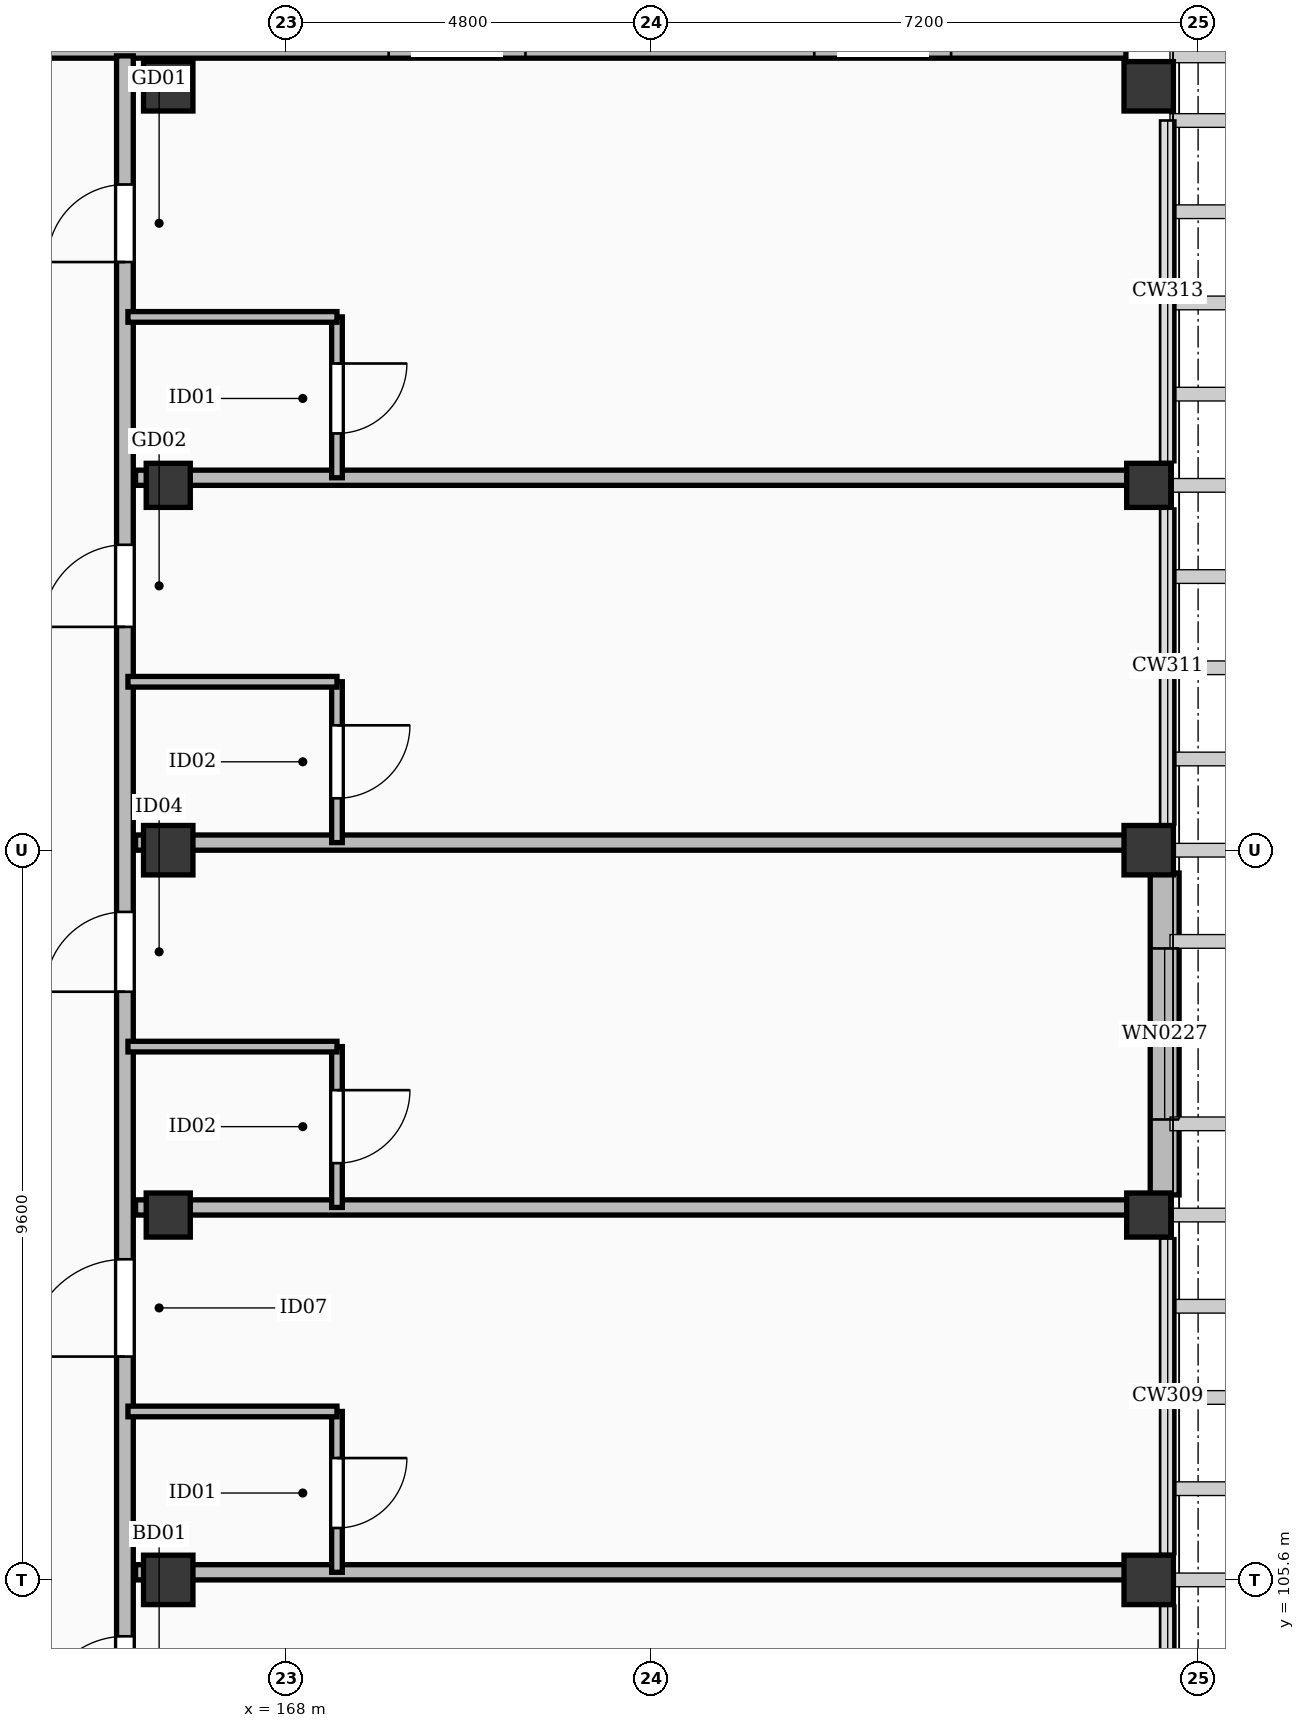
"""IFC4 building model, lengths in metres.
Left out: names, types, materials, properties, quantities, classifications, styles, units other than length and angle.
Written with IfcOpenShell. Run it as: python <this file> out.ifc"""

import sys

from ifc_helpers import new_model, si_unit, direction, frame, frame_2d, origin, origin_2d, place, context, subcontext, project, spatial, rectangle, extrude, element, fill, save


model = new_model("IFC4")
c1 = context("Model", 3, precision=1e-05, world=origin(), true_north=direction((0.0, 1.0)))
c2 = subcontext(c1, "Body", "Model", "MODEL_VIEW")
j1 = project(units=[si_unit("LENGTHUNIT", "METRE"), si_unit("PLANEANGLEUNIT", "RADIAN")], contexts=[c1])
p1 = place(None, origin())
s1 = spatial("IfcSite", under=j1, at=p1, CompositionType="ELEMENT")
p2 = place(p1, origin())
s2 = spatial("IfcBuilding", under=s1, at=p2, CompositionType="ELEMENT")
p3 = place(p2, frame((0.0, 0.0, 39.0)))
s3 = spatial("IfcBuildingStorey", under=s2, at=p3, CompositionType="ELEMENT", Elevation=39.0)
for number, where, z_axis, x_axis in (
    (1, (166.45, 105.6, 0.0), (0.0, 0.0, 1.0), (1.0, 0.0, 0.0)),
    (2, (166.45, 115.2, 0.0), (0.0, 0.0, 1.0), (1.0, 0.0, 0.0)),
    (3, (166.45, 125.25, 0.0), (0.0, 0.0, 1.0), (1.0, 0.0, 0.0)),
    (4, (179.35, 105.6, 0.0), (0.0, 0.0, 1.0), (1.0, 0.0, 0.0)),
    (5, (179.35, 115.2, 0.0), (0.0, 0.0, 1.0), (1.0, 0.0, 0.0)),
    (6, (179.35, 125.25, 0.0), (0.0, 0.0, 1.0), (1.0, 0.0, 0.0)),
):
    element("IfcColumn", number, at=place(p3, frame(where, z_axis=z_axis, x_axis=x_axis)), inside=s3, PredefinedType="COLUMN", context=c2, shape_type="SweptSolid", body=[
        extrude(rectangle(XDim=0.65, YDim=0.65, at=origin_2d()), origin(), (0.0, 0.0, 1.0), 3.6),
    ])
for number, where, z_axis, x_axis in (
    (7, (166.45, 110.4, 0.0), (0.0, 0.0, 1.0), (1.0, 0.0, 0.0)),
    (8, (166.45, 120.0, 0.0), (0.0, 0.0, 1.0), (1.0, 0.0, 0.0)),
    (9, (179.35, 110.4, 0.0), (0.0, 0.0, 1.0), (1.0, 0.0, 0.0)),
    (10, (179.35, 120.0, 0.0), (0.0, 0.0, 1.0), (1.0, 0.0, 0.0)),
):
    element("IfcColumn", number, at=place(p3, frame(where, z_axis=z_axis, x_axis=x_axis)), inside=s3, PredefinedType="COLUMN", context=c2, shape_type="SweptSolid", body=[
        extrude(rectangle(XDim=0.58, YDim=0.58, at=origin_2d()), origin(), (0.0, 0.0, 1.0), 3.6),
    ])
p4 = place(p3, frame((149.75, 125.81, 0.0), z_axis=(0.0, 0.0, 1.0), x_axis=(1.0, 0.0, 0.0)))
e11 = element("IfcWall", 11, at=p4, inside=s3, PredefinedType="SOLIDWALL", context=c2, shape_type="SweptSolid", body=[
    extrude(rectangle(XDim=29.3, YDim=0.38, at=frame_2d((14.65, 0.0))), origin(), (0.0, 0.0, 1.0), 3.36),
])
p5 = place(p4, frame((3.6, 0.0, 0.55)))
e12 = element("IfcOpeningElement", 12, at=p5, cuts=e11, PredefinedType="OPENING", context=c2, shape_type="SweptSolid", body=[
    extrude(rectangle(XDim=1.8, YDim=1.76, at=frame_2d((0.9, 0.88))), frame((0.0, 0.202, 0.0), z_axis=(0.0, -1.0, 0.0), x_axis=(1.0, 0.0, 0.0)), (0.0, 0.0, 1.0), 0.404),
])
p6 = place(p4, frame((9.2, 0.0, 0.55)))
e13 = element("IfcOpeningElement", 13, at=p6, cuts=e11, PredefinedType="OPENING", context=c2, shape_type="SweptSolid", body=[
    extrude(rectangle(XDim=1.8, YDim=1.76, at=frame_2d((0.9, 0.88))), frame((0.0, 0.202, 0.0), z_axis=(0.0, -1.0, 0.0), x_axis=(1.0, 0.0, 0.0)), (0.0, 0.0, 1.0), 0.404),
])
p7 = place(p4, frame((19.6, 0.0, 0.55)))
e14 = element("IfcOpeningElement", 14, at=p7, cuts=e11, PredefinedType="OPENING", context=c2, shape_type="SweptSolid", body=[
    extrude(rectangle(XDim=1.8, YDim=1.76, at=frame_2d((0.9, 0.88))), frame((0.0, 0.202, 0.0), z_axis=(0.0, -1.0, 0.0), x_axis=(1.0, 0.0, 0.0)), (0.0, 0.0, 1.0), 0.404),
])
p8 = place(p4, frame((25.2, 0.0, 0.55)))
e15 = element("IfcOpeningElement", 15, at=p8, cuts=e11, PredefinedType="OPENING", context=c2, shape_type="SweptSolid", body=[
    extrude(rectangle(XDim=1.8, YDim=1.76, at=frame_2d((0.9, 0.88))), frame((0.0, 0.202, 0.0), z_axis=(0.0, -1.0, 0.0), x_axis=(1.0, 0.0, 0.0)), (0.0, 0.0, 1.0), 0.404),
])
p9 = place(p3, frame((179.56, 114.9, 0.0), z_axis=(0.0, 0.0, 1.0), x_axis=(0.0, -1.0, 0.0)))
e16 = element("IfcWall", 16, at=p9, inside=s3, PredefinedType="SOLIDWALL", context=c2, shape_type="SweptSolid", body=[
    extrude(rectangle(XDim=4.235, YDim=0.38, at=frame_2d((2.117, 0.0))), origin(), (0.0, 0.0, 1.0), 2.602),
])
p10 = place(p9, frame((0.992, 0.0, 0.55)))
e17 = element("IfcOpeningElement", 17, at=p10, cuts=e16, PredefinedType="OPENING", context=c2, shape_type="SweptSolid", body=[
    extrude(rectangle(XDim=2.25, YDim=1.79, at=frame_2d((1.125, 0.895))), frame((0.0, 0.202, 0.0), z_axis=(0.0, -1.0, 0.0), x_axis=(1.0, 0.0, 0.0)), (0.0, 0.0, 1.0), 0.404),
])
p11 = place(p3, frame((165.88, 57.95, 0.0), z_axis=(0.0, 0.0, 1.0), x_axis=(0.0, 1.0, 0.0)))
e18 = element("IfcWall", 18, at=p11, inside=s3, PredefinedType="PARTITIONING", context=c2, shape_type="SweptSolid", body=[
    extrude(rectangle(XDim=67.7, YDim=0.22, at=frame_2d((33.85, 0.0))), origin(), (0.0, 0.0, 1.0), 2.602),
])
p12 = place(p11, frame((5.15, 0.0, 0.0)))
e19 = element("IfcOpeningElement", 19, at=p12, cuts=e18, PredefinedType="OPENING", context=c2, shape_type="SweptSolid", body=[
    extrude(rectangle(XDim=0.98, YDim=2.15, at=frame_2d((0.49, 1.075))), frame((0.0, 0.122, 0.0), z_axis=(0.0, -1.0, 0.0), x_axis=(1.0, 0.0, 0.0)), (0.0, 0.0, 1.0), 0.244),
])
p13 = place(p11, frame((11.838, 0.0, 0.0)))
e20 = element("IfcOpeningElement", 20, at=p13, cuts=e18, PredefinedType="OPENING", context=c2, shape_type="SweptSolid", body=[
    extrude(rectangle(XDim=1.5, YDim=2.3, at=frame_2d((0.75, 1.15))), frame((0.0, 0.122, 0.0), z_axis=(0.0, -1.0, 0.0), x_axis=(1.0, 0.0, 0.0)), (0.0, 0.0, 1.0), 0.244),
])
p14 = place(p11, frame((16.988, 0.0, 0.0)))
e21 = element("IfcOpeningElement", 21, at=p14, cuts=e18, PredefinedType="OPENING", context=c2, shape_type="SweptSolid", body=[
    extrude(rectangle(XDim=1.12, YDim=2.15, at=frame_2d((0.56, 1.075))), frame((0.0, 0.122, 0.0), z_axis=(0.0, -1.0, 0.0), x_axis=(1.0, 0.0, 0.0)), (0.0, 0.0, 1.0), 0.244),
])
p15 = place(p11, frame((21.788, 0.0, 0.0)))
e22 = element("IfcOpeningElement", 22, at=p15, cuts=e18, PredefinedType="OPENING", context=c2, shape_type="SweptSolid", body=[
    extrude(rectangle(XDim=1.28, YDim=2.16, at=frame_2d((0.64, 1.08))), frame((0.0, 0.122, 0.0), z_axis=(0.0, -1.0, 0.0), x_axis=(1.0, 0.0, 0.0)), (0.0, 0.0, 1.0), 0.244),
])
p16 = place(p11, frame((26.588, 0.0, 0.0)))
e23 = element("IfcOpeningElement", 23, at=p16, cuts=e18, PredefinedType="OPENING", context=c2, shape_type="SweptSolid", body=[
    extrude(rectangle(XDim=1.05, YDim=2.18, at=frame_2d((0.525, 1.09))), frame((0.0, 0.122, 0.0), z_axis=(0.0, -1.0, 0.0), x_axis=(1.0, 0.0, 0.0)), (0.0, 0.0, 1.0), 0.244),
])
p17 = place(p11, frame((31.388, 0.0, 0.0)))
e24 = element("IfcOpeningElement", 24, at=p17, cuts=e18, PredefinedType="OPENING", context=c2, shape_type="SweptSolid", body=[
    extrude(rectangle(XDim=1.08, YDim=2.25, at=frame_2d((0.54, 1.125))), frame((0.0, 0.122, 0.0), z_axis=(0.0, -1.0, 0.0), x_axis=(1.0, 0.0, 0.0)), (0.0, 0.0, 1.0), 0.244),
])
p18 = place(p11, frame((36.188, 0.0, 0.0)))
e25 = element("IfcOpeningElement", 25, at=p18, cuts=e18, PredefinedType="OPENING", context=c2, shape_type="SweptSolid", body=[
    extrude(rectangle(XDim=1.02, YDim=2.2, at=frame_2d((0.51, 1.1))), frame((0.0, 0.122, 0.0), z_axis=(0.0, -1.0, 0.0), x_axis=(1.0, 0.0, 0.0)), (0.0, 0.0, 1.0), 0.244),
])
p19 = place(p11, frame((40.638, 0.0, 0.0)))
e26 = element("IfcOpeningElement", 26, at=p19, cuts=e18, PredefinedType="OPENING", context=c2, shape_type="SweptSolid", body=[
    extrude(rectangle(XDim=1.5, YDim=2.3, at=frame_2d((0.75, 1.15))), frame((0.0, 0.122, 0.0), z_axis=(0.0, -1.0, 0.0), x_axis=(1.0, 0.0, 0.0)), (0.0, 0.0, 1.0), 0.244),
])
p20 = place(p11, frame((45.788, 0.0, 0.0)))
e27 = element("IfcOpeningElement", 27, at=p20, cuts=e18, PredefinedType="OPENING", context=c2, shape_type="SweptSolid", body=[
    extrude(rectangle(XDim=1.12, YDim=2.15, at=frame_2d((0.56, 1.075))), frame((0.0, 0.122, 0.0), z_axis=(0.0, -1.0, 0.0), x_axis=(1.0, 0.0, 0.0)), (0.0, 0.0, 1.0), 0.244),
])
p21 = place(p11, frame((50.588, 0.0, 0.0)))
e28 = element("IfcOpeningElement", 28, at=p21, cuts=e18, PredefinedType="OPENING", context=c2, shape_type="SweptSolid", body=[
    extrude(rectangle(XDim=1.28, YDim=2.16, at=frame_2d((0.64, 1.08))), frame((0.0, 0.122, 0.0), z_axis=(0.0, -1.0, 0.0), x_axis=(1.0, 0.0, 0.0)), (0.0, 0.0, 1.0), 0.244),
])
p22 = place(p11, frame((55.388, 0.0, 0.0)))
e29 = element("IfcOpeningElement", 29, at=p22, cuts=e18, PredefinedType="OPENING", context=c2, shape_type="SweptSolid", body=[
    extrude(rectangle(XDim=1.05, YDim=2.18, at=frame_2d((0.525, 1.09))), frame((0.0, 0.122, 0.0), z_axis=(0.0, -1.0, 0.0), x_axis=(1.0, 0.0, 0.0)), (0.0, 0.0, 1.0), 0.244),
])
p23 = place(p11, frame((60.188, 0.0, 0.0)))
e30 = element("IfcOpeningElement", 30, at=p23, cuts=e18, PredefinedType="OPENING", context=c2, shape_type="SweptSolid", body=[
    extrude(rectangle(XDim=1.08, YDim=2.25, at=frame_2d((0.54, 1.125))), frame((0.0, 0.122, 0.0), z_axis=(0.0, -1.0, 0.0), x_axis=(1.0, 0.0, 0.0)), (0.0, 0.0, 1.0), 0.244),
])
p24 = place(p11, frame((64.988, 0.0, 0.0)))
e31 = element("IfcOpeningElement", 31, at=p24, cuts=e18, PredefinedType="OPENING", context=c2, shape_type="SweptSolid", body=[
    extrude(rectangle(XDim=1.02, YDim=2.2, at=frame_2d((0.51, 1.1))), frame((0.0, 0.122, 0.0), z_axis=(0.0, -1.0, 0.0), x_axis=(1.0, 0.0, 0.0)), (0.0, 0.0, 1.0), 0.244),
])
p25 = place(p3, frame((166.02, 105.7, 0.0), z_axis=(0.0, 0.0, 1.0), x_axis=(1.0, 0.0, 0.0)))
e32 = element("IfcWall", 32, at=p25, inside=s3, PredefinedType="PARTITIONING", context=c2, shape_type="SweptSolid", body=[
    extrude(rectangle(XDim=13.23, YDim=0.2, at=frame_2d((6.615, 0.0))), origin(), (0.0, 0.0, 1.0), 2.602),
])
p26 = place(p3, frame((168.67, 105.7, 0.0), z_axis=(0.0, 0.0, 1.0), x_axis=(0.0, 1.0, 0.0)))
e33 = element("IfcWall", 33, at=p26, inside=s3, PredefinedType="PARTITIONING", context=c2, shape_type="SweptSolid", body=[
    extrude(rectangle(XDim=2.116, YDim=0.14, at=frame_2d((1.058, 0.0))), origin(), (0.0, 0.0, 1.0), 2.772),
])
p27 = place(p26, frame((0.583, 0.0, 0.0)))
e34 = element("IfcOpeningElement", 34, at=p27, cuts=e33, PredefinedType="OPENING", context=c2, shape_type="SweptSolid", body=[
    extrude(rectangle(XDim=0.92, YDim=2.1, at=frame_2d((0.46, 1.05))), frame((0.0, 0.082, 0.0), z_axis=(0.0, -1.0, 0.0), x_axis=(1.0, 0.0, 0.0)), (0.0, 0.0, 1.0), 0.164),
])
p28 = place(p3, frame((165.92, 107.816, 0.0), z_axis=(0.0, 0.0, 1.0), x_axis=(1.0, 0.0, 0.0)))
e35 = element("IfcWall", 35, at=p28, inside=s3, PredefinedType="PARTITIONING", context=c2, shape_type="SweptSolid", body=[
    extrude(rectangle(XDim=2.75, YDim=0.14, at=frame_2d((1.375, 0.0))), origin(), (0.0, 0.0, 1.0), 2.772),
])
p29 = place(p3, frame((166.02, 110.5, 0.0), z_axis=(0.0, 0.0, 1.0), x_axis=(1.0, 0.0, 0.0)))
e36 = element("IfcWall", 36, at=p29, inside=s3, PredefinedType="PARTITIONING", context=c2, shape_type="SweptSolid", body=[
    extrude(rectangle(XDim=13.23, YDim=0.2, at=frame_2d((6.615, 0.0))), origin(), (0.0, 0.0, 1.0), 2.602),
])
p30 = place(p3, frame((168.67, 110.5, 0.0), z_axis=(0.0, 0.0, 1.0), x_axis=(0.0, 1.0, 0.0)))
e37 = element("IfcWall", 37, at=p30, inside=s3, PredefinedType="PARTITIONING", context=c2, shape_type="SweptSolid", body=[
    extrude(rectangle(XDim=2.116, YDim=0.14, at=frame_2d((1.058, 0.0))), origin(), (0.0, 0.0, 1.0), 2.772),
])
p31 = place(p30, frame((0.583, 0.0, 0.0)))
e38 = element("IfcOpeningElement", 38, at=p31, cuts=e37, PredefinedType="OPENING", context=c2, shape_type="SweptSolid", body=[
    extrude(rectangle(XDim=0.96, YDim=2.12, at=frame_2d((0.48, 1.06))), frame((0.0, 0.082, 0.0), z_axis=(0.0, -1.0, 0.0), x_axis=(1.0, 0.0, 0.0)), (0.0, 0.0, 1.0), 0.164),
])
p32 = place(p3, frame((165.92, 112.616, 0.0), z_axis=(0.0, 0.0, 1.0), x_axis=(1.0, 0.0, 0.0)))
e39 = element("IfcWall", 39, at=p32, inside=s3, PredefinedType="PARTITIONING", context=c2, shape_type="SweptSolid", body=[
    extrude(rectangle(XDim=2.75, YDim=0.14, at=frame_2d((1.375, 0.0))), origin(), (0.0, 0.0, 1.0), 2.772),
])
p33 = place(p3, frame((166.02, 115.3, 0.0), z_axis=(0.0, 0.0, 1.0), x_axis=(1.0, 0.0, 0.0)))
e40 = element("IfcWall", 40, at=p33, inside=s3, PredefinedType="PARTITIONING", context=c2, shape_type="SweptSolid", body=[
    extrude(rectangle(XDim=13.23, YDim=0.2, at=frame_2d((6.615, 0.0))), origin(), (0.0, 0.0, 1.0), 2.602),
])
p34 = place(p3, frame((168.67, 115.3, 0.0), z_axis=(0.0, 0.0, 1.0), x_axis=(0.0, 1.0, 0.0)))
e41 = element("IfcWall", 41, at=p34, inside=s3, PredefinedType="PARTITIONING", context=c2, shape_type="SweptSolid", body=[
    extrude(rectangle(XDim=2.116, YDim=0.14, at=frame_2d((1.058, 0.0))), origin(), (0.0, 0.0, 1.0), 2.772),
])
p35 = place(p34, frame((0.583, 0.0, 0.0)))
e42 = element("IfcOpeningElement", 42, at=p35, cuts=e41, PredefinedType="OPENING", context=c2, shape_type="SweptSolid", body=[
    extrude(rectangle(XDim=0.96, YDim=2.12, at=frame_2d((0.48, 1.06))), frame((0.0, 0.082, 0.0), z_axis=(0.0, -1.0, 0.0), x_axis=(1.0, 0.0, 0.0)), (0.0, 0.0, 1.0), 0.164),
])
p36 = place(p3, frame((165.92, 117.416, 0.0), z_axis=(0.0, 0.0, 1.0), x_axis=(1.0, 0.0, 0.0)))
e43 = element("IfcWall", 43, at=p36, inside=s3, PredefinedType="PARTITIONING", context=c2, shape_type="SweptSolid", body=[
    extrude(rectangle(XDim=2.75, YDim=0.14, at=frame_2d((1.375, 0.0))), origin(), (0.0, 0.0, 1.0), 2.772),
])
p37 = place(p3, frame((166.02, 120.1, 0.0), z_axis=(0.0, 0.0, 1.0), x_axis=(1.0, 0.0, 0.0)))
e44 = element("IfcWall", 44, at=p37, inside=s3, PredefinedType="PARTITIONING", context=c2, shape_type="SweptSolid", body=[
    extrude(rectangle(XDim=13.23, YDim=0.2, at=frame_2d((6.615, 0.0))), origin(), (0.0, 0.0, 1.0), 2.602),
])
p38 = place(p3, frame((168.67, 120.1, 0.0), z_axis=(0.0, 0.0, 1.0), x_axis=(0.0, 1.0, 0.0)))
e45 = element("IfcWall", 45, at=p38, inside=s3, PredefinedType="PARTITIONING", context=c2, shape_type="SweptSolid", body=[
    extrude(rectangle(XDim=2.116, YDim=0.14, at=frame_2d((1.058, 0.0))), origin(), (0.0, 0.0, 1.0), 2.772),
])
p39 = place(p38, frame((0.583, 0.0, 0.0)))
e46 = element("IfcOpeningElement", 46, at=p39, cuts=e45, PredefinedType="OPENING", context=c2, shape_type="SweptSolid", body=[
    extrude(rectangle(XDim=0.92, YDim=2.1, at=frame_2d((0.46, 1.05))), frame((0.0, 0.082, 0.0), z_axis=(0.0, -1.0, 0.0), x_axis=(1.0, 0.0, 0.0)), (0.0, 0.0, 1.0), 0.164),
])
p40 = place(p3, frame((165.92, 122.216, 0.0), z_axis=(0.0, 0.0, 1.0), x_axis=(1.0, 0.0, 0.0)))
e47 = element("IfcWall", 47, at=p40, inside=s3, PredefinedType="PARTITIONING", context=c2, shape_type="SweptSolid", body=[
    extrude(rectangle(XDim=2.75, YDim=0.14, at=frame_2d((1.375, 0.0))), origin(), (0.0, 0.0, 1.0), 2.772),
])
p41 = place(p10, origin())
e48 = element("IfcWindow", 48, at=p41, inside=s3, PartitioningType="SINGLE_PANEL", PredefinedType="WINDOW", context=c2, shape_type="SweptSolid", body=[
    extrude(rectangle(XDim=2.25, YDim=1.79, at=frame_2d((1.125, 0.895))), frame((0.0, 0.03, 0.0), z_axis=(0.0, -1.0, 0.0), x_axis=(1.0, 0.0, 0.0)), (0.0, 0.0, 1.0), 0.06),
])
fill(e17, e48)
p42 = place(p20, origin())
e49 = element("IfcDoor", 49, at=p42, inside=s3, OperationType="SINGLE_SWING_LEFT", PredefinedType="DOOR", context=c2, shape_type="SweptSolid", body=[
    extrude(rectangle(XDim=1.12, YDim=2.15, at=frame_2d((0.56, 1.075))), frame((0.0, 0.025, 0.0), z_axis=(0.0, -1.0, 0.0), x_axis=(1.0, 0.0, 0.0)), (0.0, 0.0, 1.0), 0.05),
])
fill(e27, e49)
p43 = place(p21, origin())
e50 = element("IfcDoor", 50, at=p43, inside=s3, OperationType="SINGLE_SWING_LEFT", PredefinedType="DOOR", context=c2, shape_type="SweptSolid", body=[
    extrude(rectangle(XDim=1.28, YDim=2.16, at=frame_2d((0.64, 1.08))), frame((0.0, 0.025, 0.0), z_axis=(0.0, -1.0, 0.0), x_axis=(1.0, 0.0, 0.0)), (0.0, 0.0, 1.0), 0.05),
])
fill(e28, e50)
p44 = place(p27, frame((0.92, 0.0, 0.0), z_axis=(0.0, 0.0, 1.0), x_axis=(-1.0, 0.0, 0.0)))
e51 = element("IfcDoor", 51, at=p44, inside=s3, OperationType="SINGLE_SWING_RIGHT", PredefinedType="DOOR", context=c2, shape_type="SweptSolid", body=[
    extrude(rectangle(XDim=0.92, YDim=2.1, at=frame_2d((0.46, 1.05))), frame((0.0, 0.025, 0.0), z_axis=(0.0, -1.0, 0.0), x_axis=(1.0, 0.0, 0.0)), (0.0, 0.0, 1.0), 0.05),
])
fill(e34, e51)
p45 = place(p22, origin())
e52 = element("IfcDoor", 52, at=p45, inside=s3, OperationType="SINGLE_SWING_LEFT", PredefinedType="DOOR", context=c2, shape_type="SweptSolid", body=[
    extrude(rectangle(XDim=1.05, YDim=2.18, at=frame_2d((0.525, 1.09))), frame((0.0, 0.025, 0.0), z_axis=(0.0, -1.0, 0.0), x_axis=(1.0, 0.0, 0.0)), (0.0, 0.0, 1.0), 0.05),
])
fill(e29, e52)
p46 = place(p31, frame((0.96, 0.0, 0.0), z_axis=(0.0, 0.0, 1.0), x_axis=(-1.0, 0.0, 0.0)))
e53 = element("IfcDoor", 53, at=p46, inside=s3, OperationType="SINGLE_SWING_RIGHT", PredefinedType="DOOR", context=c2, shape_type="SweptSolid", body=[
    extrude(rectangle(XDim=0.96, YDim=2.12, at=frame_2d((0.48, 1.06))), frame((0.0, 0.025, 0.0), z_axis=(0.0, -1.0, 0.0), x_axis=(1.0, 0.0, 0.0)), (0.0, 0.0, 1.0), 0.05),
])
fill(e38, e53)
p47 = place(p23, origin())
e54 = element("IfcDoor", 54, at=p47, inside=s3, OperationType="SINGLE_SWING_LEFT", PredefinedType="DOOR", context=c2, shape_type="SweptSolid", body=[
    extrude(rectangle(XDim=1.08, YDim=2.25, at=frame_2d((0.54, 1.125))), frame((0.0, 0.025, 0.0), z_axis=(0.0, -1.0, 0.0), x_axis=(1.0, 0.0, 0.0)), (0.0, 0.0, 1.0), 0.05),
])
fill(e30, e54)
p48 = place(p35, frame((0.96, 0.0, 0.0), z_axis=(0.0, 0.0, 1.0), x_axis=(-1.0, 0.0, 0.0)))
e55 = element("IfcDoor", 55, at=p48, inside=s3, OperationType="SINGLE_SWING_RIGHT", PredefinedType="DOOR", context=c2, shape_type="SweptSolid", body=[
    extrude(rectangle(XDim=0.96, YDim=2.12, at=frame_2d((0.48, 1.06))), frame((0.0, 0.025, 0.0), z_axis=(0.0, -1.0, 0.0), x_axis=(1.0, 0.0, 0.0)), (0.0, 0.0, 1.0), 0.05),
])
fill(e42, e55)
p49 = place(p24, origin())
e56 = element("IfcDoor", 56, at=p49, inside=s3, OperationType="SINGLE_SWING_LEFT", PredefinedType="DOOR", context=c2, shape_type="SweptSolid", body=[
    extrude(rectangle(XDim=1.02, YDim=2.2, at=frame_2d((0.51, 1.1))), frame((0.0, 0.025, 0.0), z_axis=(0.0, -1.0, 0.0), x_axis=(1.0, 0.0, 0.0)), (0.0, 0.0, 1.0), 0.05),
])
fill(e31, e56)
p50 = place(p39, frame((0.92, 0.0, 0.0), z_axis=(0.0, 0.0, 1.0), x_axis=(-1.0, 0.0, 0.0)))
e57 = element("IfcDoor", 57, at=p50, inside=s3, OperationType="SINGLE_SWING_RIGHT", PredefinedType="DOOR", context=c2, shape_type="SweptSolid", body=[
    extrude(rectangle(XDim=0.92, YDim=2.1, at=frame_2d((0.46, 1.05))), frame((0.0, 0.025, 0.0), z_axis=(0.0, -1.0, 0.0), x_axis=(1.0, 0.0, 0.0)), (0.0, 0.0, 1.0), 0.05),
])
fill(e46, e57)
save(model, sys.argv[1])
